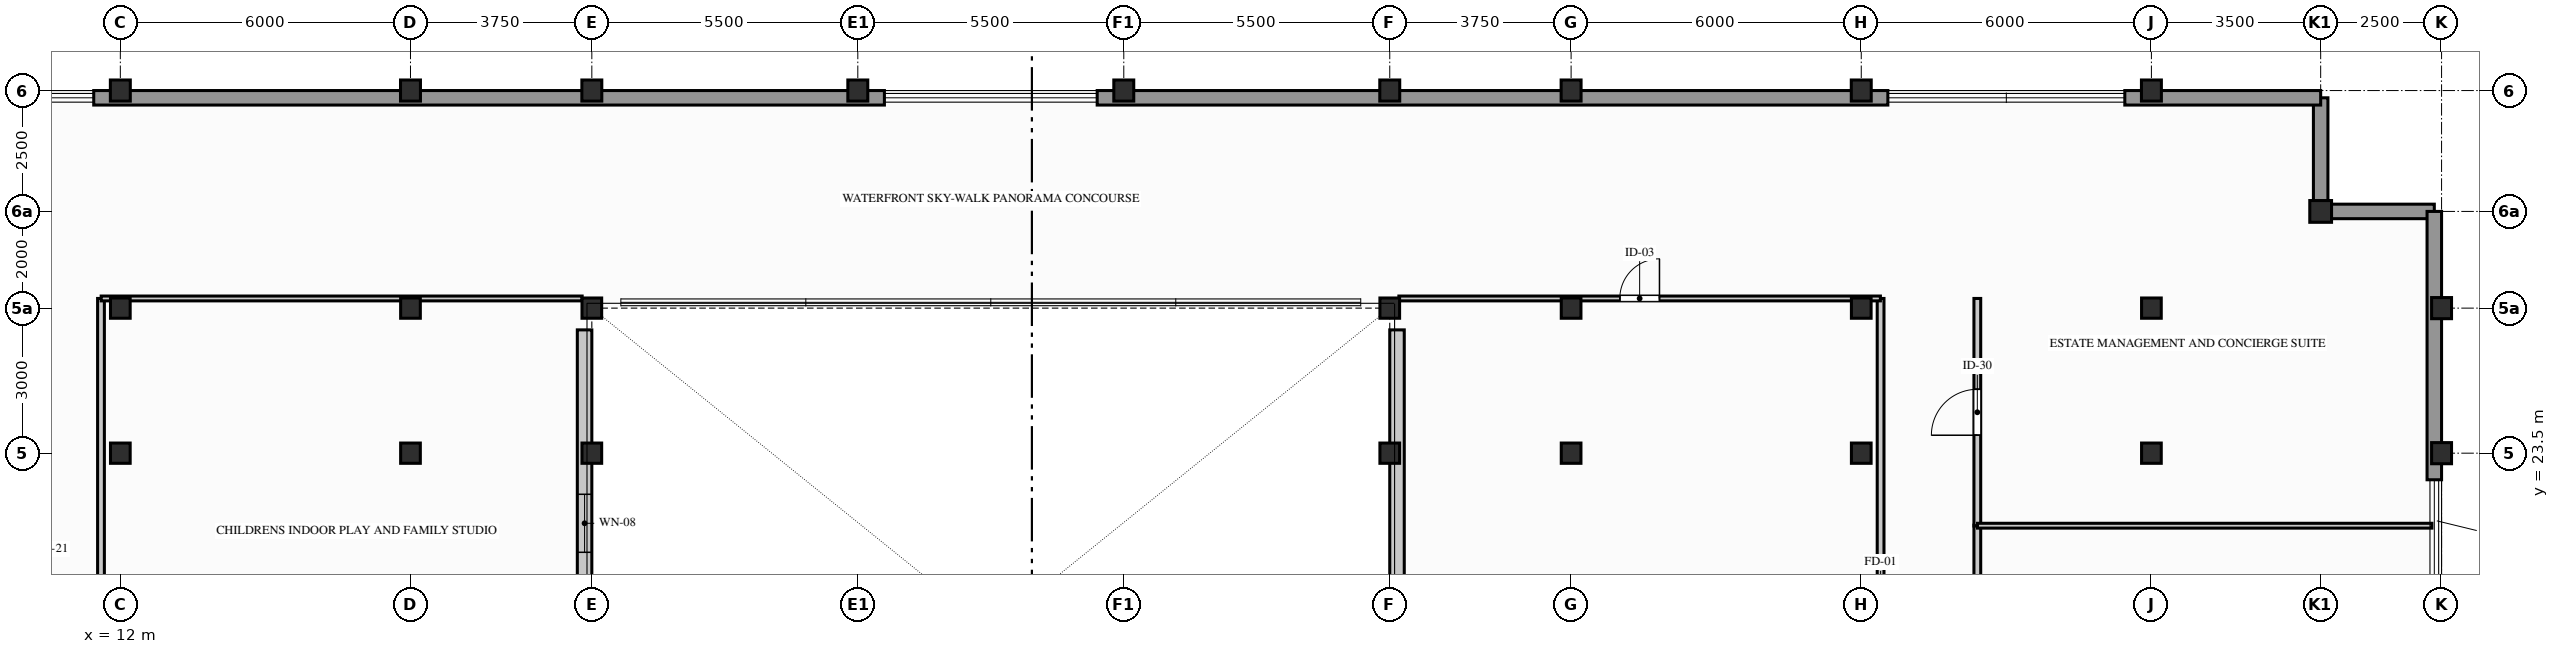
"""IFC4 building model, lengths in metres.
Left out: names, types, materials, properties, quantities, classifications, styles, units other than length and angle.
Written with IfcOpenShell. Run it as: python <this file> out.ifc"""

import sys

from ifc_helpers import new_model, si_unit, direction, frame, frame_2d, origin, origin_2d, place, context, subcontext, project, spatial, rectangle, hollow_rectangle, i_section, extrude, element, fill, save


model = new_model("IFC4")
c1 = context("Model", 3, precision=1e-05, world=origin(), true_north=direction((0.0, 1.0)))
c2 = subcontext(c1, "Body", "Model", "MODEL_VIEW")
j1 = project(units=[si_unit("LENGTHUNIT", "METRE"), si_unit("PLANEANGLEUNIT", "RADIAN")], contexts=[c1])
p1 = place(None, origin())
s1 = spatial("IfcSite", under=j1, at=p1, CompositionType="ELEMENT")
p2 = place(p1, origin())
s2 = spatial("IfcBuilding", under=s1, at=p2, CompositionType="ELEMENT")
p3 = place(p2, frame((0.0, 0.0, 134.5)))
s3 = spatial("IfcBuildingStorey", under=s2, at=p3, CompositionType="ELEMENT", Elevation=134.5)
for number, where, z_axis, x_axis in (
    (1, (12.0, 23.5, 0.0), (0.0, 0.0, 1.0), (1.0, 0.0, 0.0)),
    (2, (12.0, 26.5, 0.0), (0.0, 0.0, 1.0), (1.0, 0.0, 0.0)),
):
    element("IfcColumn", number, at=place(p3, frame(where, z_axis=z_axis, x_axis=x_axis)), inside=s3, PredefinedType="COLUMN", context=c2, shape_type="SweptSolid", body=[
        extrude(i_section(OverallWidth=0.407, OverallDepth=0.419, WebThickness=0.031, FlangeThickness=0.049, FilletRadius=0.015, at=origin_2d()), origin(), (0.0, 0.0, 1.0), 4.2),
    ])
p4 = place(p3, frame((12.0, 31.0, 0.0), z_axis=(0.0, 0.0, 1.0), x_axis=(1.0, 0.0, 0.0)))
e3 = element("IfcColumn", 3, at=p4, inside=s3, PredefinedType="COLUMN", context=c2, shape_type="SweptSolid", body=[
    extrude(i_section(OverallWidth=0.412, OverallDepth=0.437, WebThickness=0.036, FlangeThickness=0.058, FilletRadius=0.015, at=origin_2d()), origin(), (0.0, 0.0, 1.0), 4.2),
])
for number, where, z_axis, x_axis in (
    (4, (18.0, 23.5, 0.0), (0.0, 0.0, 1.0), (1.0, 0.0, 0.0)),
    (5, (18.0, 26.5, 0.0), (0.0, 0.0, 1.0), (1.0, 0.0, 0.0)),
):
    element("IfcColumn", number, at=place(p3, frame(where, z_axis=z_axis, x_axis=x_axis)), inside=s3, PredefinedType="COLUMN", context=c2, shape_type="SweptSolid", body=[
        extrude(i_section(OverallWidth=0.407, OverallDepth=0.419, WebThickness=0.031, FlangeThickness=0.049, FilletRadius=0.015, at=origin_2d()), origin(), (0.0, 0.0, 1.0), 4.2),
    ])
p5 = place(p3, frame((18.0, 31.0, 0.0), z_axis=(0.0, 0.0, 1.0), x_axis=(1.0, 0.0, 0.0)))
e6 = element("IfcColumn", 6, at=p5, inside=s3, PredefinedType="COLUMN", context=c2, shape_type="SweptSolid", body=[
    extrude(i_section(OverallWidth=0.412, OverallDepth=0.437, WebThickness=0.036, FlangeThickness=0.058, FilletRadius=0.015, at=origin_2d()), origin(), (0.0, 0.0, 1.0), 4.2),
])
for number, where, z_axis, x_axis in (
    (7, (21.75, 23.5, 0.0), (0.0, 0.0, 1.0), (1.0, 0.0, 0.0)),
    (8, (21.75, 26.5, 0.0), (0.0, 0.0, 1.0), (1.0, 0.0, 0.0)),
):
    element("IfcColumn", number, at=place(p3, frame(where, z_axis=z_axis, x_axis=x_axis)), inside=s3, PredefinedType="COLUMN", context=c2, shape_type="SweptSolid", body=[
        extrude(i_section(OverallWidth=0.407, OverallDepth=0.419, WebThickness=0.031, FlangeThickness=0.049, FilletRadius=0.015, at=origin_2d()), origin(), (0.0, 0.0, 1.0), 4.2),
    ])
for number, where, z_axis, x_axis in (
    (9, (21.75, 31.0, 0.0), (0.0, 0.0, 1.0), (1.0, 0.0, 0.0)),
    (10, (27.25, 31.0, 0.0), (0.0, 0.0, 1.0), (1.0, 0.0, 0.0)),
    (11, (32.75, 31.0, 0.0), (0.0, 0.0, 1.0), (1.0, 0.0, 0.0)),
):
    element("IfcColumn", number, at=place(p3, frame(where, z_axis=z_axis, x_axis=x_axis)), inside=s3, PredefinedType="COLUMN", context=c2, shape_type="SweptSolid", body=[
        extrude(i_section(OverallWidth=0.412, OverallDepth=0.437, WebThickness=0.036, FlangeThickness=0.058, FilletRadius=0.015, at=origin_2d()), origin(), (0.0, 0.0, 1.0), 4.2),
    ])
for number, where, z_axis, x_axis in (
    (12, (38.25, 23.5, 0.0), (0.0, 0.0, 1.0), (1.0, 0.0, 0.0)),
    (13, (38.25, 26.5, 0.0), (0.0, 0.0, 1.0), (1.0, 0.0, 0.0)),
):
    element("IfcColumn", number, at=place(p3, frame(where, z_axis=z_axis, x_axis=x_axis)), inside=s3, PredefinedType="COLUMN", context=c2, shape_type="SweptSolid", body=[
        extrude(i_section(OverallWidth=0.407, OverallDepth=0.419, WebThickness=0.031, FlangeThickness=0.049, FilletRadius=0.015, at=origin_2d()), origin(), (0.0, 0.0, 1.0), 4.2),
    ])
p6 = place(p3, frame((38.25, 31.0, 0.0), z_axis=(0.0, 0.0, 1.0), x_axis=(1.0, 0.0, 0.0)))
e14 = element("IfcColumn", 14, at=p6, inside=s3, PredefinedType="COLUMN", context=c2, shape_type="SweptSolid", body=[
    extrude(i_section(OverallWidth=0.412, OverallDepth=0.437, WebThickness=0.036, FlangeThickness=0.058, FilletRadius=0.015, at=origin_2d()), origin(), (0.0, 0.0, 1.0), 4.2),
])
for number, where, z_axis, x_axis in (
    (15, (42.0, 23.5, 0.0), (0.0, 0.0, 1.0), (1.0, 0.0, 0.0)),
    (16, (42.0, 26.5, 0.0), (0.0, 0.0, 1.0), (1.0, 0.0, 0.0)),
):
    element("IfcColumn", number, at=place(p3, frame(where, z_axis=z_axis, x_axis=x_axis)), inside=s3, PredefinedType="COLUMN", context=c2, shape_type="SweptSolid", body=[
        extrude(i_section(OverallWidth=0.407, OverallDepth=0.419, WebThickness=0.031, FlangeThickness=0.049, FilletRadius=0.015, at=origin_2d()), origin(), (0.0, 0.0, 1.0), 4.2),
    ])
p7 = place(p3, frame((42.0, 31.0, 0.0), z_axis=(0.0, 0.0, 1.0), x_axis=(1.0, 0.0, 0.0)))
e17 = element("IfcColumn", 17, at=p7, inside=s3, PredefinedType="COLUMN", context=c2, shape_type="SweptSolid", body=[
    extrude(i_section(OverallWidth=0.412, OverallDepth=0.437, WebThickness=0.036, FlangeThickness=0.058, FilletRadius=0.015, at=origin_2d()), origin(), (0.0, 0.0, 1.0), 4.2),
])
for number, where, z_axis, x_axis in (
    (18, (48.0, 23.5, 0.0), (0.0, 0.0, 1.0), (1.0, 0.0, 0.0)),
    (19, (48.0, 26.5, 0.0), (0.0, 0.0, 1.0), (1.0, 0.0, 0.0)),
):
    element("IfcColumn", number, at=place(p3, frame(where, z_axis=z_axis, x_axis=x_axis)), inside=s3, PredefinedType="COLUMN", context=c2, shape_type="SweptSolid", body=[
        extrude(i_section(OverallWidth=0.407, OverallDepth=0.419, WebThickness=0.031, FlangeThickness=0.049, FilletRadius=0.015, at=origin_2d()), origin(), (0.0, 0.0, 1.0), 4.2),
    ])
p8 = place(p3, frame((48.0, 31.0, 0.0), z_axis=(0.0, 0.0, 1.0), x_axis=(1.0, 0.0, 0.0)))
e20 = element("IfcColumn", 20, at=p8, inside=s3, PredefinedType="COLUMN", context=c2, shape_type="SweptSolid", body=[
    extrude(i_section(OverallWidth=0.412, OverallDepth=0.437, WebThickness=0.036, FlangeThickness=0.058, FilletRadius=0.015, at=origin_2d()), origin(), (0.0, 0.0, 1.0), 4.2),
])
for number, where, z_axis, x_axis in (
    (21, (54.0, 23.5, 0.0), (0.0, 0.0, 1.0), (1.0, 0.0, 0.0)),
    (22, (54.0, 26.5, 0.0), (0.0, 0.0, 1.0), (1.0, 0.0, 0.0)),
):
    element("IfcColumn", number, at=place(p3, frame(where, z_axis=z_axis, x_axis=x_axis)), inside=s3, PredefinedType="COLUMN", context=c2, shape_type="SweptSolid", body=[
        extrude(i_section(OverallWidth=0.407, OverallDepth=0.419, WebThickness=0.031, FlangeThickness=0.049, FilletRadius=0.015, at=origin_2d()), origin(), (0.0, 0.0, 1.0), 4.2),
    ])
p9 = place(p3, frame((54.0, 31.0, 0.0), z_axis=(0.0, 0.0, 1.0), x_axis=(1.0, 0.0, 0.0)))
e23 = element("IfcColumn", 23, at=p9, inside=s3, PredefinedType="COLUMN", context=c2, shape_type="SweptSolid", body=[
    extrude(i_section(OverallWidth=0.412, OverallDepth=0.437, WebThickness=0.036, FlangeThickness=0.058, FilletRadius=0.015, at=origin_2d()), origin(), (0.0, 0.0, 1.0), 4.2),
])
p10 = place(p3, frame((57.5, 28.5, 0.0), z_axis=(0.0, 0.0, 1.0), x_axis=(1.0, 0.0, 0.0)))
e24 = element("IfcColumn", 24, at=p10, inside=s3, PredefinedType="COLUMN", context=c2, shape_type="SweptSolid", body=[
    extrude(hollow_rectangle(XDim=0.45, YDim=0.45, WallThickness=0.025, InnerFilletRadius=0.012, OuterFilletRadius=0.024, at=origin_2d()), origin(), (0.0, 0.0, 1.0), 4.2),
])
for number, where, z_axis, x_axis in (
    (25, (60.0, 23.5, 0.0), (0.0, 0.0, 1.0), (1.0, 0.0, 0.0)),
    (26, (60.0, 26.5, 0.0), (0.0, 0.0, 1.0), (1.0, 0.0, 0.0)),
):
    element("IfcColumn", number, at=place(p3, frame(where, z_axis=z_axis, x_axis=x_axis)), inside=s3, PredefinedType="COLUMN", context=c2, shape_type="SweptSolid", body=[
        extrude(i_section(OverallWidth=0.412, OverallDepth=0.437, WebThickness=0.036, FlangeThickness=0.058, FilletRadius=0.015, at=origin_2d()), origin(), (0.0, 0.0, 1.0), 4.2),
    ])
for number, where, z_axis, x_axis in (
    (27, (59.85, 28.5, 0.0), (0.0, 0.0, 1.0), (-1.0, 0.0, 0.0)),
    (28, (57.5, 28.5, 0.0), (0.0, 0.0, 1.0), (0.0, 1.0, 0.0)),
):
    element("IfcWall", number, at=place(p3, frame(where, z_axis=z_axis, x_axis=x_axis)), inside=s3, PredefinedType="STANDARD", context=c2, shape_type="SweptSolid", body=[
        extrude(rectangle(XDim=2.35, YDim=0.3, at=frame_2d((1.175, 0.0))), origin(), (0.0, 0.0, 1.0), 3.98),
    ])
p11 = place(p3, frame((59.85, 22.95, 0.0), z_axis=(0.0, 0.0, 1.0), x_axis=(0.0, 1.0, 0.0)))
e29 = element("IfcWall", 29, at=p11, inside=s3, PredefinedType="STANDARD", context=c2, shape_type="SweptSolid", body=[
    extrude(rectangle(XDim=5.55, YDim=0.3, at=frame_2d((2.775, 0.0))), origin(), (0.0, 0.0, 1.0), 3.422),
])
p12 = place(p3, frame((53.45, 30.85, 0.0), z_axis=(0.0, 0.0, 1.0), x_axis=(1.0, 0.0, 0.0)))
e30 = element("IfcWall", 30, at=p12, inside=s3, PredefinedType="STANDARD", context=c2, shape_type="SweptSolid", body=[
    extrude(rectangle(XDim=4.05, YDim=0.3, at=frame_2d((2.025, 0.0))), origin(), (0.0, 0.0, 1.0), 3.98),
])
for number, where, z_axis, x_axis in (
    (31, (11.45, 30.85, 0.0), (0.0, 0.0, 1.0), (1.0, 0.0, 0.0)),
    (32, (32.2, 30.85, 0.0), (0.0, 0.0, 1.0), (1.0, 0.0, 0.0)),
):
    element("IfcWall", number, at=place(p3, frame(where, z_axis=z_axis, x_axis=x_axis)), inside=s3, PredefinedType="STANDARD", context=c2, shape_type="SweptSolid", body=[
        extrude(rectangle(XDim=16.35, YDim=0.3, at=frame_2d((8.175, 0.0))), origin(), (0.0, 0.0, 1.0), 3.422),
    ])
p13 = place(p3, frame((21.6, 26.05, 0.0), z_axis=(0.0, 0.0, 1.0), x_axis=(0.0, -1.0, 0.0)))
e33 = element("IfcWall", 33, at=p13, inside=s3, PredefinedType="STANDARD", context=c2, shape_type="SweptSolid", body=[
    extrude(rectangle(XDim=12.4, YDim=0.3, at=frame_2d((6.2, 0.0))), origin(), (0.0, 0.0, 1.0), 3.343),
])
p14 = place(p13, frame((3.4, 0.0, 0.5)))
e34 = element("IfcOpeningElement", 34, at=p14, cuts=e33, PredefinedType="OPENING", context=c2, shape_type="SweptSolid", body=[
    extrude(rectangle(XDim=1.2, YDim=1.6, at=frame_2d((0.6, 0.8))), frame((0.0, 0.16, 0.0), z_axis=(0.0, -1.0, 0.0), x_axis=(1.0, 0.0, 0.0)), (0.0, 0.0, 1.0), 0.32),
])
p15 = place(p3, frame((38.4, 13.65, 0.0), z_axis=(0.0, 0.0, 1.0), x_axis=(0.0, 1.0, 0.0)))
e35 = element("IfcWall", 35, at=p15, inside=s3, PredefinedType="STANDARD", context=c2, shape_type="SweptSolid", body=[
    extrude(rectangle(XDim=12.4, YDim=0.3, at=frame_2d((6.2, 0.0))), origin(), (0.0, 0.0, 1.0), 3.343),
])
p16 = place(p15, frame((3.2, 0.0, 0.5)))
e36 = element("IfcOpeningElement", 36, at=p16, cuts=e35, PredefinedType="OPENING", context=c2, shape_type="SweptSolid", body=[
    extrude(rectangle(XDim=1.2, YDim=1.6, at=frame_2d((0.6, 0.8))), frame((0.0, 0.16, 0.0), z_axis=(0.0, -1.0, 0.0), x_axis=(1.0, 0.0, 0.0)), (0.0, 0.0, 1.0), 0.32),
])
p17 = place(p3, frame((11.6, 13.189, 0.0), z_axis=(0.0, 0.0, 1.0), x_axis=(0.0, 1.0, 0.0)))
e37 = element("IfcWall", 37, at=p17, inside=s3, PredefinedType="PARTITIONING", context=c2, shape_type="SweptSolid", body=[
    extrude(rectangle(XDim=13.511, YDim=0.14, at=frame_2d((6.756, 0.0))), origin(), (0.0, 0.0, 1.0), 3.343),
])
p18 = place(p17, frame((6.231, 0.0, 0.0)))
e38 = element("IfcOpeningElement", 38, at=p18, cuts=e37, PredefinedType="OPENING", context=c2, shape_type="SweptSolid", body=[
    extrude(rectangle(XDim=1.05, YDim=2.06, at=frame_2d((0.525, 1.03))), frame((0.0, 0.08, 0.0), z_axis=(0.0, -1.0, 0.0), x_axis=(1.0, 0.0, 0.0)), (0.0, 0.0, 1.0), 0.16),
])
p19 = place(p3, frame((48.4, 13.189, 0.0), z_axis=(0.0, 0.0, 1.0), x_axis=(0.0, 1.0, 0.0)))
e39 = element("IfcWall", 39, at=p19, inside=s3, PredefinedType="PARTITIONING", context=c2, shape_type="SweptSolid", body=[
    extrude(rectangle(XDim=13.511, YDim=0.14, at=frame_2d((6.756, 0.0))), origin(), (0.0, 0.0, 1.0), 3.343),
])
p20 = place(p19, frame((6.231, 0.0, 0.0)))
e40 = element("IfcOpeningElement", 40, at=p20, cuts=e39, PredefinedType="OPENING", context=c2, shape_type="SweptSolid", body=[
    extrude(rectangle(XDim=1.05, YDim=2.06, at=frame_2d((0.525, 1.03))), frame((0.0, 0.08, 0.0), z_axis=(0.0, -1.0, 0.0), x_axis=(1.0, 0.0, 0.0)), (0.0, 0.0, 1.0), 0.16),
])
p21 = place(p3, frame((50.4, 12.804, 0.0), z_axis=(0.0, 0.0, 1.0), x_axis=(0.0, 1.0, 0.0)))
e41 = element("IfcWall", 41, at=p21, inside=s3, PredefinedType="PARTITIONING", context=c2, shape_type="SweptSolid", body=[
    extrude(rectangle(XDim=9.207, YDim=0.14, at=frame_2d((4.604, 0.0))), origin(), (0.0, 0.0, 1.0), 3.343),
])
p22 = place(p3, frame((50.4, 21.993, 0.0), z_axis=(0.0, 0.0, 1.0), x_axis=(0.0, 1.0, 0.0)))
e42 = element("IfcWall", 42, at=p22, inside=s3, PredefinedType="PARTITIONING", context=c2, shape_type="SweptSolid", body=[
    extrude(rectangle(XDim=4.707, YDim=0.14, at=frame_2d((2.354, 0.0))), origin(), (0.0, 0.0, 1.0), 3.343),
])
p23 = place(p22, frame((1.879, 0.0, 0.0)))
e43 = element("IfcOpeningElement", 43, at=p23, cuts=e42, PredefinedType="OPENING", context=c2, shape_type="SweptSolid", body=[
    extrude(rectangle(XDim=0.95, YDim=2.05, at=frame_2d((0.475, 1.025))), frame((0.0, 0.08, 0.0), z_axis=(0.0, -1.0, 0.0), x_axis=(1.0, 0.0, 0.0)), (0.0, 0.0, 1.0), 0.16),
])
p24 = place(p3, frame((11.604, 26.7, 0.0), z_axis=(0.0, 0.0, 1.0), x_axis=(1.0, 0.0, 0.0)))
e44 = element("IfcWall", 44, at=p24, inside=s3, PredefinedType="PARTITIONING", context=c2, shape_type="SweptSolid", body=[
    extrude(rectangle(XDim=9.946, YDim=0.1, at=frame_2d((4.973, 0.0))), origin(), (0.0, 0.0, 1.0), 3.343),
])
p25 = place(p3, frame((38.439, 26.7, 0.0), z_axis=(0.0, 0.0, 1.0), x_axis=(1.0, 0.0, 0.0)))
e45 = element("IfcWall", 45, at=p25, inside=s3, PredefinedType="PARTITIONING", context=c2, shape_type="SweptSolid", body=[
    extrude(rectangle(XDim=9.957, YDim=0.1, at=frame_2d((4.979, 0.0))), origin(), (0.0, 0.0, 1.0), 3.343),
])
p26 = place(p25, frame((4.569, 0.0, 0.0)))
e46 = element("IfcOpeningElement", 46, at=p26, cuts=e45, PredefinedType="OPENING", context=c2, shape_type="SweptSolid", body=[
    extrude(rectangle(XDim=0.82, YDim=2.02, at=frame_2d((0.41, 1.01))), frame((0.0, 0.06, 0.0), z_axis=(0.0, -1.0, 0.0), x_axis=(1.0, 0.0, 0.0)), (0.0, 0.0, 1.0), 0.12),
])
p27 = place(p3, frame((50.404, 22.0, 0.0), z_axis=(0.0, 0.0, 1.0), x_axis=(1.0, 0.0, 0.0)))
e47 = element("IfcWall", 47, at=p27, inside=s3, PredefinedType="PARTITIONING", context=c2, shape_type="SweptSolid", body=[
    extrude(rectangle(XDim=9.396, YDim=0.1, at=frame_2d((4.698, 0.0))), origin(), (0.0, 0.0, 1.0), 3.343),
])
p28 = place(p14, origin())
e48 = element("IfcWindow", 48, at=p28, inside=s3, PartitioningType="SINGLE_PANEL", PredefinedType="WINDOW", context=c2, shape_type="SweptSolid", body=[
    extrude(rectangle(XDim=1.2, YDim=1.6, at=frame_2d((0.6, 0.8))), frame((0.0, 0.03, 0.0), z_axis=(0.0, -1.0, 0.0), x_axis=(1.0, 0.0, 0.0)), (0.0, 0.0, 1.0), 0.06),
])
fill(e34, e48)
p29 = place(p23, origin())
e49 = element("IfcDoor", 49, at=p29, inside=s3, OperationType="SINGLE_SWING_LEFT", PredefinedType="DOOR", context=c2, shape_type="SweptSolid", body=[
    extrude(rectangle(XDim=0.95, YDim=2.05, at=frame_2d((0.475, 1.025))), frame((0.0, 0.025, 0.0), z_axis=(0.0, -1.0, 0.0), x_axis=(1.0, 0.0, 0.0)), (0.0, 0.0, 1.0), 0.05),
])
fill(e43, e49)
p30 = place(p26, origin())
e50 = element("IfcDoor", 50, at=p30, inside=s3, OperationType="SINGLE_SWING_RIGHT", PredefinedType="DOOR", context=c2, shape_type="SweptSolid", body=[
    extrude(rectangle(XDim=0.82, YDim=2.02, at=frame_2d((0.41, 1.01))), frame((0.0, 0.025, 0.0), z_axis=(0.0, -1.0, 0.0), x_axis=(1.0, 0.0, 0.0)), (0.0, 0.0, 1.0), 0.05),
])
fill(e46, e50)
save(model, sys.argv[1])
